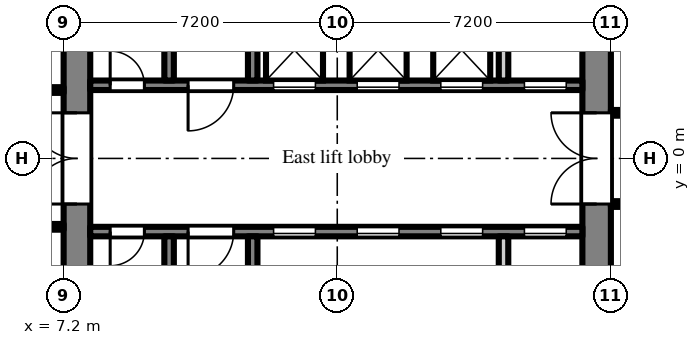
"""IFC4 building model, lengths in metres.
Left out: names, types, materials, properties, quantities, classifications, styles, units other than length and angle.
Written with IfcOpenShell. Run it as: python <this file> out.ifc"""

import sys

from ifc_helpers import new_model, si_unit, direction, frame, frame_2d, origin, place, context, subcontext, project, spatial, rectangle, extrude, element, fill, save


model = new_model("IFC4")
c1 = context("Model", 3, precision=1e-05, world=origin(), true_north=direction((0.0, 1.0)))
c2 = subcontext(c1, "Body", "Model", "MODEL_VIEW")
j1 = project(units=[si_unit("LENGTHUNIT", "METRE"), si_unit("PLANEANGLEUNIT", "RADIAN")], contexts=[c1])
p1 = place(None, origin())
s1 = spatial("IfcSite", under=j1, at=p1, CompositionType="ELEMENT")
p2 = place(p1, origin())
s2 = spatial("IfcBuilding", under=s1, at=p2, CompositionType="ELEMENT")
p3 = place(p2, frame((0.0, 0.0, 116.1)))
s3 = spatial("IfcBuildingStorey", under=s2, at=p3, CompositionType="ELEMENT", Elevation=116.1)
p4 = place(p3, frame((7.55, -7.2, 0.0), z_axis=(0.0, 0.0, 1.0), x_axis=(0.0, 1.0, 0.0)))
e1 = element("IfcWall", 1, at=p4, inside=s3, PredefinedType="SHEAR", context=c2, shape_type="SweptSolid", body=[
    extrude(rectangle(XDim=14.4, YDim=0.7, at=frame_2d((7.2, 0.0))), origin(), (0.0, 0.0, 1.0), 3.8),
])
p5 = place(p4, frame((6.0, 0.0, 0.0)))
e2 = element("IfcOpeningElement", 2, at=p5, cuts=e1, PredefinedType="OPENING", context=c2, shape_type="SweptSolid", body=[
    extrude(rectangle(XDim=2.4, YDim=2.2, at=frame_2d((1.2, 1.1))), frame((0.0, 0.36, 0.0), z_axis=(0.0, -1.0, 0.0), x_axis=(1.0, 0.0, 0.0)), (0.0, 0.0, 1.0), 0.72),
])
p6 = place(p3, frame((21.225, -7.2, 0.0), z_axis=(0.0, 0.0, 1.0), x_axis=(0.0, 1.0, 0.0)))
e3 = element("IfcWall", 3, at=p6, inside=s3, PredefinedType="SHEAR", context=c2, shape_type="SweptSolid", body=[
    extrude(rectangle(XDim=14.4, YDim=0.75, at=frame_2d((7.2, 0.0))), origin(), (0.0, 0.0, 1.0), 3.8),
])
p7 = place(p6, frame((6.0, 0.0, 0.0)))
e4 = element("IfcOpeningElement", 4, at=p7, cuts=e3, PredefinedType="OPENING", context=c2, shape_type="SweptSolid", body=[
    extrude(rectangle(XDim=2.4, YDim=2.2, at=frame_2d((1.2, 1.1))), frame((0.0, 0.385, 0.0), z_axis=(0.0, -1.0, 0.0), x_axis=(1.0, 0.0, 0.0)), (0.0, 0.0, 1.0), 0.77),
])
p8 = place(p3, frame((7.9, 1.925, 0.0), z_axis=(0.0, 0.0, 1.0), x_axis=(1.0, 0.0, 0.0)))
e5 = element("IfcWall", 5, at=p8, inside=s3, PredefinedType="SHEAR", context=c2, shape_type="SweptSolid", body=[
    extrude(rectangle(XDim=12.95, YDim=0.25, at=frame_2d((6.475, 0.0))), origin(), (0.0, 0.0, 1.0), 3.8),
])
p9 = place(p8, frame((4.825, 0.0, 0.0)))
e6 = element("IfcOpeningElement", 6, at=p9, cuts=e5, PredefinedType="OPENING", context=c2, shape_type="SweptSolid", body=[
    extrude(rectangle(XDim=1.1, YDim=2.1, at=frame_2d((0.55, 1.05))), frame((0.0, 0.135, 0.0), z_axis=(0.0, -1.0, 0.0), x_axis=(1.0, 0.0, 0.0)), (0.0, 0.0, 1.0), 0.27),
])
p10 = place(p8, frame((7.025, 0.0, 0.0)))
e7 = element("IfcOpeningElement", 7, at=p10, cuts=e5, PredefinedType="OPENING", context=c2, shape_type="SweptSolid", body=[
    extrude(rectangle(XDim=1.1, YDim=2.1, at=frame_2d((0.55, 1.05))), frame((0.0, 0.135, 0.0), z_axis=(0.0, -1.0, 0.0), x_axis=(1.0, 0.0, 0.0)), (0.0, 0.0, 1.0), 0.27),
])
p11 = place(p8, frame((9.225, 0.0, 0.0)))
e8 = element("IfcOpeningElement", 8, at=p11, cuts=e5, PredefinedType="OPENING", context=c2, shape_type="SweptSolid", body=[
    extrude(rectangle(XDim=1.1, YDim=2.1, at=frame_2d((0.55, 1.05))), frame((0.0, 0.135, 0.0), z_axis=(0.0, -1.0, 0.0), x_axis=(1.0, 0.0, 0.0)), (0.0, 0.0, 1.0), 0.27),
])
p12 = place(p8, frame((11.425, 0.0, 0.0)))
e9 = element("IfcOpeningElement", 9, at=p12, cuts=e5, PredefinedType="OPENING", context=c2, shape_type="SweptSolid", body=[
    extrude(rectangle(XDim=1.1, YDim=2.1, at=frame_2d((0.55, 1.05))), frame((0.0, 0.135, 0.0), z_axis=(0.0, -1.0, 0.0), x_axis=(1.0, 0.0, 0.0)), (0.0, 0.0, 1.0), 0.27),
])
p13 = place(p8, frame((0.525, 0.0, 0.0)))
e10 = element("IfcOpeningElement", 10, at=p13, cuts=e5, PredefinedType="OPENING", context=c2, shape_type="SweptSolid", body=[
    extrude(rectangle(XDim=0.9, YDim=2.1, at=frame_2d((0.45, 1.05))), frame((0.0, 0.135, 0.0), z_axis=(0.0, -1.0, 0.0), x_axis=(1.0, 0.0, 0.0)), (0.0, 0.0, 1.0), 0.27),
])
p14 = place(p8, frame((2.575, 0.0, 0.0)))
e11 = element("IfcOpeningElement", 11, at=p14, cuts=e5, PredefinedType="OPENING", context=c2, shape_type="SweptSolid", body=[
    extrude(rectangle(XDim=1.2, YDim=2.1, at=frame_2d((0.6, 1.05))), frame((0.0, 0.135, 0.0), z_axis=(0.0, -1.0, 0.0), x_axis=(1.0, 0.0, 0.0)), (0.0, 0.0, 1.0), 0.27),
])
p15 = place(p3, frame((9.975, 2.05, 0.0), z_axis=(0.0, 0.0, 1.0), x_axis=(0.0, 1.0, 0.0)))
e12 = element("IfcWall", 12, at=p15, inside=s3, PredefinedType="SHEAR", context=c2, shape_type="SweptSolid", body=[
    extrude(rectangle(XDim=4.7, YDim=0.25, at=frame_2d((2.35, 0.0))), origin(), (0.0, 0.0, 1.0), 3.8),
])
p16 = place(p15, frame((2.95, 0.0, 0.0)))
e13 = element("IfcOpeningElement", 13, at=p16, cuts=e12, PredefinedType="OPENING", context=c2, shape_type="SweptSolid", body=[
    extrude(rectangle(XDim=1.1, YDim=2.1, at=frame_2d((0.55, 1.05))), frame((0.0, 0.135, 0.0), z_axis=(0.0, -1.0, 0.0), x_axis=(1.0, 0.0, 0.0)), (0.0, 0.0, 1.0), 0.27),
])
p17 = place(p3, frame((12.175, 2.05, 0.0), z_axis=(0.0, 0.0, 1.0), x_axis=(0.0, 1.0, 0.0)))
e14 = element("IfcWall", 14, at=p17, inside=s3, PredefinedType="SHEAR", context=c2, shape_type="SweptSolid", body=[
    extrude(rectangle(XDim=4.7, YDim=0.25, at=frame_2d((2.35, 0.0))), origin(), (0.0, 0.0, 1.0), 3.8),
])
p18 = place(p17, frame((2.925, 0.0, 0.0)))
e15 = element("IfcOpeningElement", 15, at=p18, cuts=e14, PredefinedType="OPENING", context=c2, shape_type="SweptSolid", body=[
    extrude(rectangle(XDim=1.2, YDim=2.1, at=frame_2d((0.6, 1.05))), frame((0.0, 0.135, 0.0), z_axis=(0.0, -1.0, 0.0), x_axis=(1.0, 0.0, 0.0)), (0.0, 0.0, 1.0), 0.27),
])
p19 = place(p3, frame((18.775, 2.05, 0.0), z_axis=(0.0, 0.0, 1.0), x_axis=(0.0, 1.0, 0.0)))
e16 = element("IfcWall", 16, at=p19, inside=s3, PredefinedType="PARTITIONING", context=c2, shape_type="SweptSolid", body=[
    extrude(rectangle(XDim=2.1, YDim=0.25, at=frame_2d((1.05, 0.0))), origin(), (0.0, 0.0, 1.0), 3.8),
])
p20 = place(p3, frame((7.9, -1.925, 0.0), z_axis=(0.0, 0.0, 1.0), x_axis=(1.0, 0.0, 0.0)))
e17 = element("IfcWall", 17, at=p20, inside=s3, PredefinedType="SHEAR", context=c2, shape_type="SweptSolid", body=[
    extrude(rectangle(XDim=12.95, YDim=0.25, at=frame_2d((6.475, 0.0))), origin(), (0.0, 0.0, 1.0), 3.8),
])
p21 = place(p20, frame((4.825, 0.0, 0.0)))
e18 = element("IfcOpeningElement", 18, at=p21, cuts=e17, PredefinedType="OPENING", context=c2, shape_type="SweptSolid", body=[
    extrude(rectangle(XDim=1.1, YDim=2.1, at=frame_2d((0.55, 1.05))), frame((0.0, 0.135, 0.0), z_axis=(0.0, -1.0, 0.0), x_axis=(1.0, 0.0, 0.0)), (0.0, 0.0, 1.0), 0.27),
])
p22 = place(p20, frame((7.025, 0.0, 0.0)))
e19 = element("IfcOpeningElement", 19, at=p22, cuts=e17, PredefinedType="OPENING", context=c2, shape_type="SweptSolid", body=[
    extrude(rectangle(XDim=1.1, YDim=2.1, at=frame_2d((0.55, 1.05))), frame((0.0, 0.135, 0.0), z_axis=(0.0, -1.0, 0.0), x_axis=(1.0, 0.0, 0.0)), (0.0, 0.0, 1.0), 0.27),
])
p23 = place(p20, frame((9.225, 0.0, 0.0)))
e20 = element("IfcOpeningElement", 20, at=p23, cuts=e17, PredefinedType="OPENING", context=c2, shape_type="SweptSolid", body=[
    extrude(rectangle(XDim=1.1, YDim=2.1, at=frame_2d((0.55, 1.05))), frame((0.0, 0.135, 0.0), z_axis=(0.0, -1.0, 0.0), x_axis=(1.0, 0.0, 0.0)), (0.0, 0.0, 1.0), 0.27),
])
p24 = place(p20, frame((11.425, 0.0, 0.0)))
e21 = element("IfcOpeningElement", 21, at=p24, cuts=e17, PredefinedType="OPENING", context=c2, shape_type="SweptSolid", body=[
    extrude(rectangle(XDim=1.1, YDim=2.1, at=frame_2d((0.55, 1.05))), frame((0.0, 0.135, 0.0), z_axis=(0.0, -1.0, 0.0), x_axis=(1.0, 0.0, 0.0)), (0.0, 0.0, 1.0), 0.27),
])
p25 = place(p20, frame((0.525, 0.0, 0.0)))
e22 = element("IfcOpeningElement", 22, at=p25, cuts=e17, PredefinedType="OPENING", context=c2, shape_type="SweptSolid", body=[
    extrude(rectangle(XDim=0.9, YDim=2.1, at=frame_2d((0.45, 1.05))), frame((0.0, 0.135, 0.0), z_axis=(0.0, -1.0, 0.0), x_axis=(1.0, 0.0, 0.0)), (0.0, 0.0, 1.0), 0.27),
])
p26 = place(p20, frame((2.575, 0.0, 0.0)))
e23 = element("IfcOpeningElement", 23, at=p26, cuts=e17, PredefinedType="OPENING", context=c2, shape_type="SweptSolid", body=[
    extrude(rectangle(XDim=1.2, YDim=2.1, at=frame_2d((0.6, 1.05))), frame((0.0, 0.135, 0.0), z_axis=(0.0, -1.0, 0.0), x_axis=(1.0, 0.0, 0.0)), (0.0, 0.0, 1.0), 0.27),
])
p27 = place(p3, frame((9.975, -2.05, 0.0), z_axis=(0.0, 0.0, 1.0), x_axis=(0.0, -1.0, 0.0)))
e24 = element("IfcWall", 24, at=p27, inside=s3, PredefinedType="SHEAR", context=c2, shape_type="SweptSolid", body=[
    extrude(rectangle(XDim=4.7, YDim=0.25, at=frame_2d((2.35, 0.0))), origin(), (0.0, 0.0, 1.0), 3.8),
])
p28 = place(p27, frame((2.95, 0.0, 0.0)))
e25 = element("IfcOpeningElement", 25, at=p28, cuts=e24, PredefinedType="OPENING", context=c2, shape_type="SweptSolid", body=[
    extrude(rectangle(XDim=1.1, YDim=2.1, at=frame_2d((0.55, 1.05))), frame((0.0, 0.135, 0.0), z_axis=(0.0, -1.0, 0.0), x_axis=(1.0, 0.0, 0.0)), (0.0, 0.0, 1.0), 0.27),
])
p29 = place(p3, frame((12.175, -2.05, 0.0), z_axis=(0.0, 0.0, 1.0), x_axis=(0.0, -1.0, 0.0)))
e26 = element("IfcWall", 26, at=p29, inside=s3, PredefinedType="SHEAR", context=c2, shape_type="SweptSolid", body=[
    extrude(rectangle(XDim=4.7, YDim=0.25, at=frame_2d((2.35, 0.0))), origin(), (0.0, 0.0, 1.0), 3.8),
])
p30 = place(p29, frame((2.925, 0.0, 0.0)))
e27 = element("IfcOpeningElement", 27, at=p30, cuts=e26, PredefinedType="OPENING", context=c2, shape_type="SweptSolid", body=[
    extrude(rectangle(XDim=1.2, YDim=2.1, at=frame_2d((0.6, 1.05))), frame((0.0, 0.135, 0.0), z_axis=(0.0, -1.0, 0.0), x_axis=(1.0, 0.0, 0.0)), (0.0, 0.0, 1.0), 0.27),
])
p31 = place(p3, frame((18.775, -2.05, 0.0), z_axis=(0.0, 0.0, 1.0), x_axis=(0.0, -1.0, 0.0)))
e28 = element("IfcWall", 28, at=p31, inside=s3, PredefinedType="PARTITIONING", context=c2, shape_type="SweptSolid", body=[
    extrude(rectangle(XDim=2.1, YDim=0.25, at=frame_2d((1.05, 0.0))), origin(), (0.0, 0.0, 1.0), 3.8),
])
p32 = place(p3, frame((1.875, -1.8, 0.0), z_axis=(0.0, 0.0, 1.0), x_axis=(1.0, 0.0, 0.0)))
e29 = element("IfcWall", 29, at=p32, inside=s3, PredefinedType="PARTITIONING", context=c2, shape_type="SweptSolid", body=[
    extrude(rectangle(XDim=5.325, YDim=0.15, at=frame_2d((2.663, 0.0))), origin(), (0.0, 0.0, 1.0), 3.8),
])
p33 = place(p32, frame((0.1, 0.0, 0.0)))
e30 = element("IfcOpeningElement", 30, at=p33, cuts=e29, PredefinedType="OPENING", context=c2, shape_type="SweptSolid", body=[
    extrude(rectangle(XDim=0.9, YDim=2.1, at=frame_2d((0.45, 1.05))), frame((0.0, 0.085, 0.0), z_axis=(0.0, -1.0, 0.0), x_axis=(1.0, 0.0, 0.0)), (0.0, 0.0, 1.0), 0.17),
])
p34 = place(p32, frame((2.875, 0.0, 0.0)))
e31 = element("IfcOpeningElement", 31, at=p34, cuts=e29, PredefinedType="OPENING", context=c2, shape_type="SweptSolid", body=[
    extrude(rectangle(XDim=1.8, YDim=2.1, at=frame_2d((0.9, 1.05))), frame((0.0, 0.085, 0.0), z_axis=(0.0, -1.0, 0.0), x_axis=(1.0, 0.0, 0.0)), (0.0, 0.0, 1.0), 0.17),
])
p35 = place(p3, frame((1.875, 1.8, 0.0), z_axis=(0.0, 0.0, 1.0), x_axis=(1.0, 0.0, 0.0)))
e32 = element("IfcWall", 32, at=p35, inside=s3, PredefinedType="PARTITIONING", context=c2, shape_type="SweptSolid", body=[
    extrude(rectangle(XDim=5.325, YDim=0.15, at=frame_2d((2.663, 0.0))), origin(), (0.0, 0.0, 1.0), 3.8),
])
p36 = place(p35, frame((0.575, 0.0, 0.0)))
e33 = element("IfcOpeningElement", 33, at=p36, cuts=e32, PredefinedType="OPENING", context=c2, shape_type="SweptSolid", body=[
    extrude(rectangle(XDim=0.9, YDim=2.1, at=frame_2d((0.45, 1.05))), frame((0.0, 0.085, 0.0), z_axis=(0.0, -1.0, 0.0), x_axis=(1.0, 0.0, 0.0)), (0.0, 0.0, 1.0), 0.17),
])
p37 = place(p3, frame((21.6, -1.2, 0.0), z_axis=(0.0, 0.0, 1.0), x_axis=(1.0, 0.0, 0.0)))
e34 = element("IfcWall", 34, at=p37, inside=s3, PredefinedType="PARTITIONING", context=c2, shape_type="SweptSolid", body=[
    extrude(rectangle(XDim=14.9, YDim=0.15, at=frame_2d((7.45, 0.0))), origin(), (0.0, 0.0, 1.0), 3.8),
])
p38 = place(p37, frame((3.1, 0.0, 0.0)))
e35 = element("IfcOpeningElement", 35, at=p38, cuts=e34, PredefinedType="OPENING", context=c2, shape_type="SweptSolid", body=[
    extrude(rectangle(XDim=1.0, YDim=2.1, at=frame_2d((0.5, 1.05))), frame((0.0, 0.085, 0.0), z_axis=(0.0, -1.0, 0.0), x_axis=(1.0, 0.0, 0.0)), (0.0, 0.0, 1.0), 0.17),
])
p39 = place(p37, frame((10.15, 0.0, 0.0)))
e36 = element("IfcOpeningElement", 36, at=p39, cuts=e34, PredefinedType="OPENING", context=c2, shape_type="SweptSolid", body=[
    extrude(rectangle(XDim=1.8, YDim=2.1, at=frame_2d((0.9, 1.05))), frame((0.0, 0.085, 0.0), z_axis=(0.0, -1.0, 0.0), x_axis=(1.0, 0.0, 0.0)), (0.0, 0.0, 1.0), 0.17),
])
p40 = place(p3, frame((21.6, 1.2, 0.0), z_axis=(0.0, 0.0, 1.0), x_axis=(1.0, 0.0, 0.0)))
e37 = element("IfcWall", 37, at=p40, inside=s3, PredefinedType="PARTITIONING", context=c2, shape_type="SweptSolid", body=[
    extrude(rectangle(XDim=14.9, YDim=0.15, at=frame_2d((7.45, 0.0))), origin(), (0.0, 0.0, 1.0), 3.8),
])
p41 = place(p40, frame((0.65, 0.0, 0.0)))
e38 = element("IfcOpeningElement", 38, at=p41, cuts=e37, PredefinedType="OPENING", context=c2, shape_type="SweptSolid", body=[
    extrude(rectangle(XDim=1.8, YDim=2.1, at=frame_2d((0.9, 1.05))), frame((0.0, 0.085, 0.0), z_axis=(0.0, -1.0, 0.0), x_axis=(1.0, 0.0, 0.0)), (0.0, 0.0, 1.0), 0.17),
])
p42 = place(p40, frame((5.5, 0.0, 0.0)))
e39 = element("IfcOpeningElement", 39, at=p42, cuts=e37, PredefinedType="OPENING", context=c2, shape_type="SweptSolid", body=[
    extrude(rectangle(XDim=1.0, YDim=2.1, at=frame_2d((0.5, 1.05))), frame((0.0, 0.085, 0.0), z_axis=(0.0, -1.0, 0.0), x_axis=(1.0, 0.0, 0.0)), (0.0, 0.0, 1.0), 0.17),
])
p43 = place(p40, frame((9.35, 0.0, 0.0)))
e40 = element("IfcOpeningElement", 40, at=p43, cuts=e37, PredefinedType="OPENING", context=c2, shape_type="SweptSolid", body=[
    extrude(rectangle(XDim=1.8, YDim=2.1, at=frame_2d((0.9, 1.05))), frame((0.0, 0.085, 0.0), z_axis=(0.0, -1.0, 0.0), x_axis=(1.0, 0.0, 0.0)), (0.0, 0.0, 1.0), 0.17),
])
p44 = place(p40, frame((12.95, 0.0, 0.0)))
e41 = element("IfcOpeningElement", 41, at=p44, cuts=e37, PredefinedType="OPENING", context=c2, shape_type="SweptSolid", body=[
    extrude(rectangle(XDim=1.0, YDim=2.1, at=frame_2d((0.5, 1.05))), frame((0.0, 0.085, 0.0), z_axis=(0.0, -1.0, 0.0), x_axis=(1.0, 0.0, 0.0)), (0.0, 0.0, 1.0), 0.17),
])
p45 = place(p21, origin())
e42 = element("IfcDoor", 42, at=p45, inside=s3, OperationType="SLIDING_TO_LEFT", PredefinedType="DOOR", context=c2, shape_type="SweptSolid", body=[
    extrude(rectangle(XDim=1.1, YDim=2.1, at=frame_2d((0.55, 1.05))), frame((0.0, 0.025, 0.0), z_axis=(0.0, -1.0, 0.0), x_axis=(1.0, 0.0, 0.0)), (0.0, 0.0, 1.0), 0.05),
])
fill(e18, e42)
p46 = place(p22, origin())
e43 = element("IfcDoor", 43, at=p46, inside=s3, OperationType="SLIDING_TO_LEFT", PredefinedType="DOOR", context=c2, shape_type="SweptSolid", body=[
    extrude(rectangle(XDim=1.1, YDim=2.1, at=frame_2d((0.55, 1.05))), frame((0.0, 0.025, 0.0), z_axis=(0.0, -1.0, 0.0), x_axis=(1.0, 0.0, 0.0)), (0.0, 0.0, 1.0), 0.05),
])
fill(e19, e43)
p47 = place(p23, origin())
e44 = element("IfcDoor", 44, at=p47, inside=s3, OperationType="SLIDING_TO_LEFT", PredefinedType="DOOR", context=c2, shape_type="SweptSolid", body=[
    extrude(rectangle(XDim=1.1, YDim=2.1, at=frame_2d((0.55, 1.05))), frame((0.0, 0.025, 0.0), z_axis=(0.0, -1.0, 0.0), x_axis=(1.0, 0.0, 0.0)), (0.0, 0.0, 1.0), 0.05),
])
fill(e20, e44)
p48 = place(p24, origin())
e45 = element("IfcDoor", 45, at=p48, inside=s3, OperationType="SLIDING_TO_LEFT", PredefinedType="DOOR", context=c2, shape_type="SweptSolid", body=[
    extrude(rectangle(XDim=1.1, YDim=2.1, at=frame_2d((0.55, 1.05))), frame((0.0, 0.025, 0.0), z_axis=(0.0, -1.0, 0.0), x_axis=(1.0, 0.0, 0.0)), (0.0, 0.0, 1.0), 0.05),
])
fill(e21, e45)
p49 = place(p9, origin())
e46 = element("IfcDoor", 46, at=p49, inside=s3, OperationType="SLIDING_TO_LEFT", PredefinedType="DOOR", context=c2, shape_type="SweptSolid", body=[
    extrude(rectangle(XDim=1.1, YDim=2.1, at=frame_2d((0.55, 1.05))), frame((0.0, 0.025, 0.0), z_axis=(0.0, -1.0, 0.0), x_axis=(1.0, 0.0, 0.0)), (0.0, 0.0, 1.0), 0.05),
])
fill(e6, e46)
p50 = place(p10, origin())
e47 = element("IfcDoor", 47, at=p50, inside=s3, OperationType="SLIDING_TO_LEFT", PredefinedType="DOOR", context=c2, shape_type="SweptSolid", body=[
    extrude(rectangle(XDim=1.1, YDim=2.1, at=frame_2d((0.55, 1.05))), frame((0.0, 0.025, 0.0), z_axis=(0.0, -1.0, 0.0), x_axis=(1.0, 0.0, 0.0)), (0.0, 0.0, 1.0), 0.05),
])
fill(e7, e47)
p51 = place(p11, origin())
e48 = element("IfcDoor", 48, at=p51, inside=s3, OperationType="SLIDING_TO_LEFT", PredefinedType="DOOR", context=c2, shape_type="SweptSolid", body=[
    extrude(rectangle(XDim=1.1, YDim=2.1, at=frame_2d((0.55, 1.05))), frame((0.0, 0.025, 0.0), z_axis=(0.0, -1.0, 0.0), x_axis=(1.0, 0.0, 0.0)), (0.0, 0.0, 1.0), 0.05),
])
fill(e8, e48)
p52 = place(p12, origin())
e49 = element("IfcDoor", 49, at=p52, inside=s3, OperationType="SLIDING_TO_LEFT", PredefinedType="DOOR", context=c2, shape_type="SweptSolid", body=[
    extrude(rectangle(XDim=1.1, YDim=2.1, at=frame_2d((0.55, 1.05))), frame((0.0, 0.025, 0.0), z_axis=(0.0, -1.0, 0.0), x_axis=(1.0, 0.0, 0.0)), (0.0, 0.0, 1.0), 0.05),
])
fill(e9, e49)
p53 = place(p13, origin())
e50 = element("IfcDoor", 50, at=p53, inside=s3, OperationType="SINGLE_SWING_LEFT", PredefinedType="DOOR", context=c2, shape_type="SweptSolid", body=[
    extrude(rectangle(XDim=0.9, YDim=2.1, at=frame_2d((0.45, 1.05))), frame((0.0, 0.025, 0.0), z_axis=(0.0, -1.0, 0.0), x_axis=(1.0, 0.0, 0.0)), (0.0, 0.0, 1.0), 0.05),
])
fill(e10, e50)
p54 = place(p25, frame((0.9, 0.0, 0.0), z_axis=(0.0, 0.0, 1.0), x_axis=(-1.0, 0.0, 0.0)))
e51 = element("IfcDoor", 51, at=p54, inside=s3, OperationType="SINGLE_SWING_RIGHT", PredefinedType="DOOR", context=c2, shape_type="SweptSolid", body=[
    extrude(rectangle(XDim=0.9, YDim=2.1, at=frame_2d((0.45, 1.05))), frame((0.0, 0.025, 0.0), z_axis=(0.0, -1.0, 0.0), x_axis=(1.0, 0.0, 0.0)), (0.0, 0.0, 1.0), 0.05),
])
fill(e22, e51)
p55 = place(p14, frame((1.2, 0.0, 0.0), z_axis=(0.0, 0.0, 1.0), x_axis=(-1.0, 0.0, 0.0)))
e52 = element("IfcDoor", 52, at=p55, inside=s3, OperationType="SINGLE_SWING_RIGHT", PredefinedType="DOOR", context=c2, shape_type="SweptSolid", body=[
    extrude(rectangle(XDim=1.2, YDim=2.1, at=frame_2d((0.6, 1.05))), frame((0.0, 0.025, 0.0), z_axis=(0.0, -1.0, 0.0), x_axis=(1.0, 0.0, 0.0)), (0.0, 0.0, 1.0), 0.05),
])
fill(e11, e52)
p56 = place(p26, frame((1.2, 0.0, 0.0), z_axis=(0.0, 0.0, 1.0), x_axis=(-1.0, 0.0, 0.0)))
e53 = element("IfcDoor", 53, at=p56, inside=s3, OperationType="SINGLE_SWING_RIGHT", PredefinedType="DOOR", context=c2, shape_type="SweptSolid", body=[
    extrude(rectangle(XDim=1.2, YDim=2.1, at=frame_2d((0.6, 1.05))), frame((0.0, 0.025, 0.0), z_axis=(0.0, -1.0, 0.0), x_axis=(1.0, 0.0, 0.0)), (0.0, 0.0, 1.0), 0.05),
])
fill(e23, e53)
p57 = place(p5, origin())
e54 = element("IfcDoor", 54, at=p57, inside=s3, OperationType="DOUBLE_DOOR_DOUBLE_SWING", PredefinedType="DOOR", context=c2, shape_type="SweptSolid", body=[
    extrude(rectangle(XDim=2.4, YDim=2.2, at=frame_2d((1.2, 1.1))), frame((0.0, 0.025, 0.0), z_axis=(0.0, -1.0, 0.0), x_axis=(1.0, 0.0, 0.0)), (0.0, 0.0, 1.0), 0.05),
])
fill(e2, e54)
p58 = place(p7, origin())
e55 = element("IfcDoor", 55, at=p58, inside=s3, OperationType="DOUBLE_DOOR_DOUBLE_SWING", PredefinedType="DOOR", context=c2, shape_type="SweptSolid", body=[
    extrude(rectangle(XDim=2.4, YDim=2.2, at=frame_2d((1.2, 1.1))), frame((0.0, 0.025, 0.0), z_axis=(0.0, -1.0, 0.0), x_axis=(1.0, 0.0, 0.0)), (0.0, 0.0, 1.0), 0.05),
])
fill(e4, e55)
save(model, sys.argv[1])
